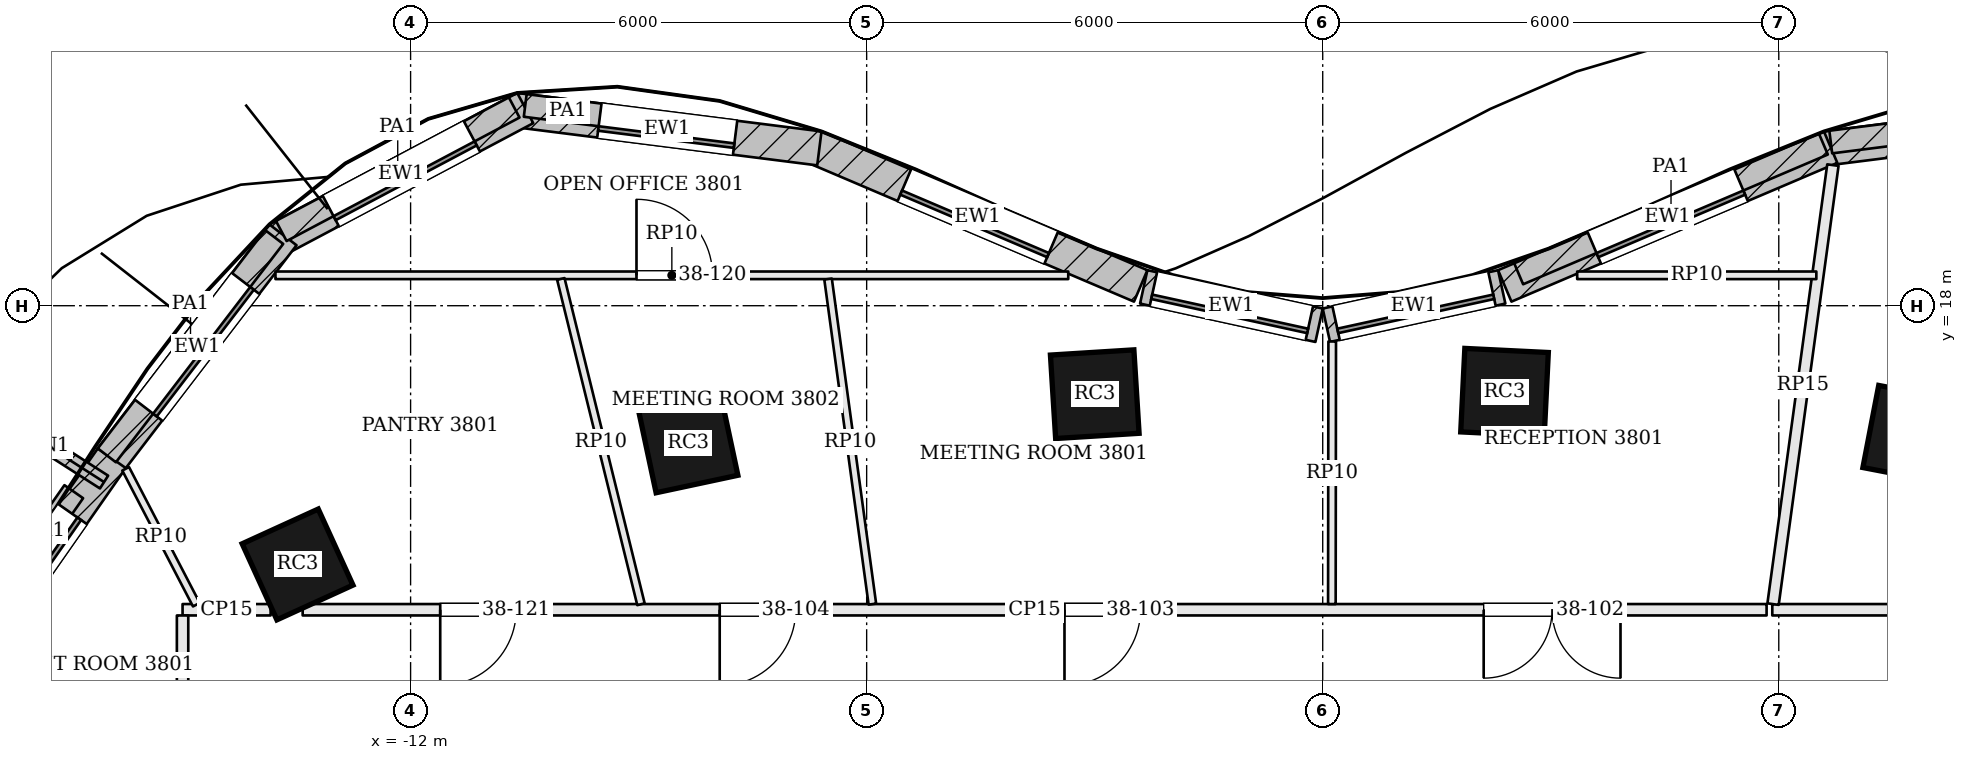
"""IFC4 building model, lengths in metres.
Left out: names, types, materials, properties, quantities, classifications, styles, units other than length and angle.
Written with IfcOpenShell. Run it as: python <this file> out.ifc"""

import sys

from ifc_helpers import new_model, si_unit, direction, frame, frame_2d, origin, origin_2d, place, context, subcontext, project, spatial, rectangle, extrude, element, fill, save


model = new_model("IFC4")
c1 = context("Model", 3, precision=1e-05, world=origin(), true_north=direction((0.0, 1.0)))
c2 = subcontext(c1, "Body", "Model", "MODEL_VIEW")
j1 = project(units=[si_unit("LENGTHUNIT", "METRE"), si_unit("PLANEANGLEUNIT", "RADIAN")], contexts=[c1])
p1 = place(None, origin())
s1 = spatial("IfcSite", under=j1, at=p1, CompositionType="ELEMENT")
p2 = place(p1, origin())
s2 = spatial("IfcBuilding", under=s1, at=p2, CompositionType="ELEMENT")
p3 = place(p2, frame((0.0, 0.0, 157.8)))
s3 = spatial("IfcBuildingStorey", under=s2, at=p3, CompositionType="ELEMENT", Elevation=157.8)
for number, where, z_axis, x_axis in (
    (1, (7.751, 16.307, 0.0), (0.0, 0.0, 1.0), (-0.982, 0.189, 0.0)),
    (2, (2.392, 16.862, 0.0), (0.0, 0.0, 1.0), (-0.999, 0.049, 0.0)),
    (3, (-2.999, 16.836, 0.0), (0.0, 0.0, 1.0), (-0.998, -0.062, 0.0)),
    (4, (-8.347, 16.192, 0.0), (0.0, 0.0, 1.0), (-0.978, -0.209, 0.0)),
    (5, (-13.487, 14.596, 0.0), (0.0, 0.0, 1.0), (-0.91, -0.415, 0.0)),
):
    element("IfcColumn", number, at=place(p3, frame(where, z_axis=z_axis, x_axis=x_axis)), inside=s3, PredefinedType="COLUMN", context=c2, shape_type="SweptSolid", body=[
        extrude(rectangle(XDim=1.1, YDim=1.1, at=origin_2d()), origin(), (0.0, 0.0, 1.0), 3.9),
    ])
p4 = place(p3, frame((10.625, 20.576, 0.0), z_axis=(0.0, 0.0, 1.0), x_axis=(-0.992109407201, -0.125375133674, 0.0)))
e6 = element("IfcWall", 6, at=p4, inside=s3, PredefinedType="SOLIDWALL", context=c2, shape_type="SweptSolid", body=[
    extrude(rectangle(XDim=4.035, YDim=0.45, at=frame_2d((2.017, 0.0))), origin(), (0.0, 0.0, 1.0), 3.7),
])
p5 = place(p4, frame((1.117, 0.0, 0.9)))
e7 = element("IfcOpeningElement", 7, at=p5, cuts=e6, PredefinedType="OPENING", context=c2, shape_type="SweptSolid", body=[
    extrude(rectangle(XDim=1.8, YDim=2.3, at=frame_2d((0.9, 1.15))), frame((0.0, 0.235, 0.0), z_axis=(0.0, -1.0, 0.0), x_axis=(1.0, 0.0, 0.0)), (0.0, 0.0, 1.0), 0.47),
])
p6 = place(p3, frame((6.682, 20.086, 0.0), z_axis=(0.0, 0.0, 1.0), x_axis=(-0.920066650468, -0.391761864781, 0.0)))
e8 = element("IfcWall", 8, at=p6, inside=s3, PredefinedType="SOLIDWALL", context=c2, shape_type="SweptSolid", body=[
    extrude(rectangle(XDim=4.66, YDim=0.45, at=frame_2d((2.33, 0.0))), origin(), (0.0, 0.0, 1.0), 3.7),
])
p7 = place(p6, frame((1.28, 0.0, 0.9)))
e9 = element("IfcOpeningElement", 9, at=p7, cuts=e8, PredefinedType="OPENING", context=c2, shape_type="SweptSolid", body=[
    extrude(rectangle(XDim=2.1, YDim=2.3, at=frame_2d((1.05, 1.15))), frame((0.0, 0.235, 0.0), z_axis=(0.0, -1.0, 0.0), x_axis=(1.0, 0.0, 0.0)), (0.0, 0.0, 1.0), 0.47),
])
p8 = place(p3, frame((2.355, 18.248, 0.0), z_axis=(0.0, 0.0, 1.0), x_axis=(-0.976877755098, -0.213798623933, 0.0)))
e10 = element("IfcWall", 10, at=p8, inside=s3, PredefinedType="SOLIDWALL", context=c2, shape_type="SweptSolid", body=[
    extrude(rectangle(XDim=2.362, YDim=0.45, at=frame_2d((1.181, 0.0))), origin(), (0.0, 0.0, 1.0), 3.7),
])
p9 = place(p8, frame((0.131, 0.0, 0.9)))
e11 = element("IfcOpeningElement", 11, at=p9, cuts=e10, PredefinedType="OPENING", context=c2, shape_type="SweptSolid", body=[
    extrude(rectangle(XDim=2.1, YDim=2.3, at=frame_2d((1.05, 1.15))), frame((0.0, 0.235, 0.0), z_axis=(0.0, -1.0, 0.0), x_axis=(1.0, 0.0, 0.0)), (0.0, 0.0, 1.0), 0.47),
])
p10 = place(p3, frame((-0.048, 17.743, 0.0), z_axis=(0.0, 0.0, 1.0), x_axis=(-0.976877755098, 0.213798623933, 0.0)))
e12 = element("IfcWall", 12, at=p10, inside=s3, PredefinedType="SOLIDWALL", context=c2, shape_type="SweptSolid", body=[
    extrude(rectangle(XDim=2.362, YDim=0.45, at=frame_2d((1.181, 0.0))), origin(), (0.0, 0.0, 1.0), 3.7),
])
p11 = place(p10, frame((0.131, 0.0, 0.9)))
e13 = element("IfcOpeningElement", 13, at=p11, cuts=e12, PredefinedType="OPENING", context=c2, shape_type="SweptSolid", body=[
    extrude(rectangle(XDim=2.1, YDim=2.3, at=frame_2d((1.05, 1.15))), frame((0.0, 0.235, 0.0), z_axis=(0.0, -1.0, 0.0), x_axis=(1.0, 0.0, 0.0)), (0.0, 0.0, 1.0), 0.47),
])
p12 = place(p3, frame((-2.395, 18.26, 0.0), z_axis=(0.0, 0.0, 1.0), x_axis=(-0.920066650468, 0.391761864781, 0.0)))
e14 = element("IfcWall", 14, at=p12, inside=s3, PredefinedType="SOLIDWALL", context=c2, shape_type="SweptSolid", body=[
    extrude(rectangle(XDim=4.66, YDim=0.45, at=frame_2d((2.33, 0.0))), origin(), (0.0, 0.0, 1.0), 3.7),
])
p13 = place(p12, frame((1.28, 0.0, 0.9)))
e15 = element("IfcOpeningElement", 15, at=p13, cuts=e14, PredefinedType="OPENING", context=c2, shape_type="SweptSolid", body=[
    extrude(rectangle(XDim=2.1, YDim=2.3, at=frame_2d((1.05, 1.15))), frame((0.0, 0.235, 0.0), z_axis=(0.0, -1.0, 0.0), x_axis=(1.0, 0.0, 0.0)), (0.0, 0.0, 1.0), 0.47),
])
p14 = place(p3, frame((-6.622, 20.07, 0.0), z_axis=(0.0, 0.0, 1.0), x_axis=(-0.992109407201, 0.125375133674, 0.0)))
e16 = element("IfcWall", 16, at=p14, inside=s3, PredefinedType="SOLIDWALL", context=c2, shape_type="SweptSolid", body=[
    extrude(rectangle(XDim=4.035, YDim=0.45, at=frame_2d((2.017, 0.0))), origin(), (0.0, 0.0, 1.0), 3.7),
])
p15 = place(p14, frame((1.117, 0.0, 0.9)))
e17 = element("IfcOpeningElement", 17, at=p15, cuts=e16, PredefinedType="OPENING", context=c2, shape_type="SweptSolid", body=[
    extrude(rectangle(XDim=1.8, YDim=2.3, at=frame_2d((0.9, 1.15))), frame((0.0, 0.235, 0.0), z_axis=(0.0, -1.0, 0.0), x_axis=(1.0, 0.0, 0.0)), (0.0, 0.0, 1.0), 0.47),
])
p16 = place(p3, frame((-10.492, 20.6, 0.0), z_axis=(0.0, 0.0, 1.0), x_axis=(-0.883502778071, -0.46842591852, 0.0)))
e18 = element("IfcWall", 18, at=p16, inside=s3, PredefinedType="SOLIDWALL", context=c2, shape_type="SweptSolid", body=[
    extrude(rectangle(XDim=3.688, YDim=0.45, at=frame_2d((1.844, 0.0))), origin(), (0.0, 0.0, 1.0), 3.7),
])
p17 = place(p16, frame((0.794, 0.0, 0.9)))
e19 = element("IfcOpeningElement", 19, at=p17, cuts=e18, PredefinedType="OPENING", context=c2, shape_type="SweptSolid", body=[
    extrude(rectangle(XDim=2.1, YDim=2.3, at=frame_2d((1.05, 1.15))), frame((0.0, 0.235, 0.0), z_axis=(0.0, -1.0, 0.0), x_axis=(1.0, 0.0, 0.0)), (0.0, 0.0, 1.0), 0.47),
])
p18 = place(p3, frame((-13.679, 18.932, 0.0), z_axis=(0.0, 0.0, 1.0), x_axis=(-0.608206493093, -0.793778849403, 0.0)))
e20 = element("IfcWall", 20, at=p18, inside=s3, PredefinedType="SOLIDWALL", context=c2, shape_type="SweptSolid", body=[
    extrude(rectangle(XDim=3.713, YDim=0.45, at=frame_2d((1.856, 0.0))), origin(), (0.0, 0.0, 1.0), 3.7),
])
p19 = place(p18, frame((0.806, 0.0, 0.9)))
e21 = element("IfcOpeningElement", 21, at=p19, cuts=e20, PredefinedType="OPENING", context=c2, shape_type="SweptSolid", body=[
    extrude(rectangle(XDim=2.1, YDim=2.3, at=frame_2d((1.05, 1.15))), frame((0.0, 0.235, 0.0), z_axis=(0.0, -1.0, 0.0), x_axis=(1.0, 0.0, 0.0)), (0.0, 0.0, 1.0), 0.47),
])
p20 = place(p3, frame((-15.931, 15.993, 0.0), z_axis=(0.0, 0.0, 1.0), x_axis=(-0.572923675708, -0.819608724828, 0.0)))
e22 = element("IfcWall", 22, at=p20, inside=s3, PredefinedType="SOLIDWALL", context=c2, shape_type="SweptSolid", body=[
    extrude(rectangle(XDim=3.895, YDim=0.45, at=frame_2d((1.947, 0.0))), origin(), (0.0, 0.0, 1.0), 3.7),
])
p21 = place(p20, frame((0.897, 0.0, 0.9)))
e23 = element("IfcOpeningElement", 23, at=p21, cuts=e22, PredefinedType="OPENING", context=c2, shape_type="SweptSolid", body=[
    extrude(rectangle(XDim=2.1, YDim=2.3, at=frame_2d((1.05, 1.15))), frame((0.0, 0.235, 0.0), z_axis=(0.0, -1.0, 0.0), x_axis=(1.0, 0.0, 0.0)), (0.0, 0.0, 1.0), 0.47),
])
p22 = place(p3, frame((-16.033, 15.68, 0.0), z_axis=(0.0, 0.0, 1.0), x_axis=(-0.842083858075, 0.539346619503, 0.0)))
e24 = element("IfcWall", 24, at=p22, inside=s3, PredefinedType="SOLIDWALL", context=c2, shape_type="SweptSolid", body=[
    extrude(rectangle(XDim=1.75, YDim=0.2, at=frame_2d((0.875, 0.0))), origin(), (0.0, 0.0, 1.0), 3.7),
])
p23 = place(p3, frame((10.492, 20.635, 3.9), z_axis=(0.0, 0.0, 1.0), x_axis=(-0.992108633106, -0.125381259031, 0.0)))
e25 = element("IfcWall", 25, at=p23, inside=s3, PredefinedType="PARAPET", context=c2, shape_type="SweptSolid", body=[
    extrude(rectangle(XDim=3.838, YDim=0.3, at=frame_2d((1.919, 0.0))), origin(), (0.0, 0.0, 1.0), 1.1),
])
p24 = place(p3, frame((6.587, 20.127, 3.9), z_axis=(0.0, 0.0, 1.0), x_axis=(-0.920058392097, -0.39178125929, 0.0)))
e26 = element("IfcWall", 26, at=p24, inside=s3, PredefinedType="PARAPET", context=c2, shape_type="SweptSolid", body=[
    extrude(rectangle(XDim=4.357, YDim=0.3, at=frame_2d((2.179, 0.0))), origin(), (0.0, 0.0, 1.0), 1.1),
])
p25 = place(p3, frame((-9.366, 20.492, 3.9), z_axis=(0.0, 0.0, 1.0), x_axis=(-0.992101446216, 0.125438113889, 0.0)))
e27 = element("IfcWall", 27, at=p25, inside=s3, PredefinedType="PARAPET", context=c2, shape_type="SweptSolid", body=[
    extrude(rectangle(XDim=1.135, YDim=0.3, at=frame_2d((0.567, 0.0))), origin(), (0.0, 0.0, 1.0), 1.1),
])
p26 = place(p3, frame((-10.637, 20.608, 3.9), z_axis=(0.0, 0.0, 1.0), x_axis=(-0.88348638041, -0.468456845003, 0.0)))
e28 = element("IfcWall", 28, at=p26, inside=s3, PredefinedType="PARAPET", context=c2, shape_type="SweptSolid", body=[
    extrude(rectangle(XDim=3.468, YDim=0.3, at=frame_2d((1.734, 0.0))), origin(), (0.0, 0.0, 1.0), 1.1),
])
p27 = place(p3, frame((-13.795, 18.904, 3.9), z_axis=(0.0, 0.0, 1.0), x_axis=(-0.608203510632, -0.793781134605, 0.0)))
e29 = element("IfcWall", 29, at=p27, inside=s3, PredefinedType="PARAPET", context=c2, shape_type="SweptSolid", body=[
    extrude(rectangle(XDim=3.619, YDim=0.3, at=frame_2d((1.81, 0.0))), origin(), (0.0, 0.0, 1.0), 1.1),
])
p28 = place(p3, frame((-16.431, 15.553, 3.9), z_axis=(0.0, 0.0, 1.0), x_axis=(-0.572902892741, -0.819623252165, 0.0)))
e30 = element("IfcWall", 30, at=p28, inside=s3, PredefinedType="PARAPET", context=c2, shape_type="SweptSolid", body=[
    extrude(rectangle(XDim=1.26, YDim=0.3, at=frame_2d((0.63, 0.0))), origin(), (0.0, 0.0, 1.0), 1.1),
])
p29 = place(p3, frame((14.925, 14.0, 0.0), z_axis=(0.0, 0.0, 1.0), x_axis=(-1.0, 0.0, 0.0)))
e31 = element("IfcWall", 31, at=p29, inside=s3, PredefinedType="PARTITIONING", context=c2, shape_type="SweptSolid", body=[
    extrude(rectangle(XDim=9.01, YDim=0.15, at=frame_2d((4.505, 0.0))), origin(), (0.0, 0.0, 1.0), 3.198),
])
p30 = place(p3, frame((6.712, 19.85, 0.0), z_axis=(0.0, 0.0, 1.0), x_axis=(-0.135032835288, -0.990841124194, 0.0)))
e32 = element("IfcWall", 32, at=p30, inside=s3, PredefinedType="PARTITIONING", context=c2, shape_type="SweptSolid", body=[
    extrude(rectangle(XDim=5.829, YDim=0.15, at=frame_2d((2.915, 0.0))), origin(), (0.0, 0.0, 1.0), 3.234),
])
p31 = place(p3, frame((5.84, 14.0, 0.0), z_axis=(0.0, 0.0, 1.0), x_axis=(-1.0, 0.0, 0.0)))
e33 = element("IfcWall", 33, at=p31, inside=s3, PredefinedType="PARTITIONING", context=c2, shape_type="SweptSolid", body=[
    extrude(rectangle(XDim=19.26, YDim=0.15, at=frame_2d((9.63, 0.0))), origin(), (0.0, 0.0, 1.0), 3.198),
])
p32 = place(p31, frame((1.922, 0.0, 0.0)))
e34 = element("IfcOpeningElement", 34, at=p32, cuts=e33, PredefinedType="OPENING", context=c2, shape_type="SweptSolid", body=[
    extrude(rectangle(XDim=1.8, YDim=2.1, at=frame_2d((0.9, 1.05))), frame((0.0, 0.085, 0.0), z_axis=(0.0, -1.0, 0.0), x_axis=(1.0, 0.0, 0.0)), (0.0, 0.0, 1.0), 0.17),
])
p33 = place(p31, frame((8.237, 0.0, 0.0)))
e35 = element("IfcOpeningElement", 35, at=p33, cuts=e33, PredefinedType="OPENING", context=c2, shape_type="SweptSolid", body=[
    extrude(rectangle(XDim=1.0, YDim=2.4, at=frame_2d((0.5, 1.2))), frame((0.0, 0.085, 0.0), z_axis=(0.0, -1.0, 0.0), x_axis=(1.0, 0.0, 0.0)), (0.0, 0.0, 1.0), 0.17),
])
p34 = place(p31, frame((12.773, 0.0, 0.0)))
e36 = element("IfcOpeningElement", 36, at=p34, cuts=e33, PredefinedType="OPENING", context=c2, shape_type="SweptSolid", body=[
    extrude(rectangle(XDim=1.0, YDim=2.4, at=frame_2d((0.5, 1.2))), frame((0.0, 0.085, 0.0), z_axis=(0.0, -1.0, 0.0), x_axis=(1.0, 0.0, 0.0)), (0.0, 0.0, 1.0), 0.17),
])
p35 = place(p31, frame((16.45, 0.0, 0.0)))
e37 = element("IfcOpeningElement", 37, at=p35, cuts=e33, PredefinedType="OPENING", context=c2, shape_type="SweptSolid", body=[
    extrude(rectangle(XDim=1.0, YDim=2.1, at=frame_2d((0.5, 1.05))), frame((0.0, 0.085, 0.0), z_axis=(0.0, -1.0, 0.0), x_axis=(1.0, 0.0, 0.0)), (0.0, 0.0, 1.0), 0.17),
])
p36 = place(p3, frame((-13.842, 14.0, 0.0), z_axis=(0.0, 0.0, 1.0), x_axis=(-1.0, 0.0, 0.0)))
e38 = element("IfcWall", 38, at=p36, inside=s3, PredefinedType="PARTITIONING", context=c2, shape_type="SweptSolid", body=[
    extrude(rectangle(XDim=1.158, YDim=0.15, at=frame_2d((0.579, 0.0))), origin(), (0.0, 0.0, 1.0), 3.198),
])
p37 = place(p3, frame((-15.0, 13.925, 0.0), z_axis=(0.0, 0.0, 1.0), x_axis=(0.0, -1.0, 0.0)))
e39 = element("IfcWall", 39, at=p37, inside=s3, PredefinedType="PARTITIONING", context=c2, shape_type="SweptSolid", body=[
    extrude(rectangle(XDim=4.596, YDim=0.15, at=frame_2d((2.298, 0.0))), origin(), (0.0, 0.0, 1.0), 3.198),
])
p38 = place(p37, frame((1.85, 0.0, 0.0)))
e40 = element("IfcOpeningElement", 40, at=p38, cuts=e39, PredefinedType="OPENING", context=c2, shape_type="SweptSolid", body=[
    extrude(rectangle(XDim=0.9, YDim=2.1, at=frame_2d((0.45, 1.05))), frame((0.0, 0.085, 0.0), z_axis=(0.0, -1.0, 0.0), x_axis=(1.0, 0.0, 0.0)), (0.0, 0.0, 1.0), 0.17),
])
p39 = place(p3, frame((-13.778, 18.4, 0.0), z_axis=(0.0, 0.0, 1.0), x_axis=(1.0, 0.0, 0.0)))
e41 = element("IfcWall", 41, at=p39, inside=s3, PredefinedType="PARTITIONING", context=c2, shape_type="SweptSolid", body=[
    extrude(rectangle(XDim=10.43, YDim=0.1, at=frame_2d((5.215, 0.0))), origin(), (0.0, 0.0, 1.0), 3.184),
])
p40 = place(p39, frame((4.75, 0.0, 0.0)))
e42 = element("IfcOpeningElement", 42, at=p40, cuts=e41, PredefinedType="OPENING", context=c2, shape_type="SweptSolid", body=[
    extrude(rectangle(XDim=1.0, YDim=2.4, at=frame_2d((0.5, 1.2))), frame((0.0, 0.06, 0.0), z_axis=(0.0, -1.0, 0.0), x_axis=(1.0, 0.0, 0.0)), (0.0, 0.0, 1.0), 0.12),
])
p41 = place(p3, frame((3.348, 18.4, 0.0), z_axis=(0.0, 0.0, 1.0), x_axis=(1.0, 0.0, 0.0)))
e43 = element("IfcWall", 43, at=p41, inside=s3, PredefinedType="PARTITIONING", context=c2, shape_type="SweptSolid", body=[
    extrude(rectangle(XDim=3.146, YDim=0.1, at=frame_2d((1.573, 0.0))), origin(), (0.0, 0.0, 1.0), 3.184),
])
p42 = place(p3, frame((0.12, 14.075, 0.0), z_axis=(0.0, 0.0, 1.0), x_axis=(0.001342849874, 0.999999098377, 0.0)))
e44 = element("IfcWall", 44, at=p42, inside=s3, PredefinedType="PARTITIONING", context=c2, shape_type="SweptSolid", body=[
    extrude(rectangle(XDim=3.454, YDim=0.1, at=frame_2d((1.727, 0.0))), origin(), (0.0, 0.0, 1.0), 3.184),
])
p43 = place(p3, frame((-5.925, 14.074, 0.0), z_axis=(0.0, 0.0, 1.0), x_axis=(-0.135027377195, 0.990841868013, 0.0)))
e45 = element("IfcWall", 45, at=p43, inside=s3, PredefinedType="PARTITIONING", context=c2, shape_type="SweptSolid", body=[
    extrude(rectangle(XDim=4.316, YDim=0.1, at=frame_2d((2.158, 0.0))), origin(), (0.0, 0.0, 1.0), 3.184),
])
p44 = place(p3, frame((-8.969, 14.073, 0.0), z_axis=(0.0, 0.0, 1.0), x_axis=(-0.239223165208, 0.970964611728, 0.0)))
e46 = element("IfcWall", 46, at=p44, inside=s3, PredefinedType="PARTITIONING", context=c2, shape_type="SweptSolid", body=[
    extrude(rectangle(XDim=4.407, YDim=0.1, at=frame_2d((2.203, 0.0))), origin(), (0.0, 0.0, 1.0), 3.184),
])
p45 = place(p3, frame((-14.819, 14.066, 0.0), z_axis=(0.0, 0.0, 1.0), x_axis=(-0.461451910157, 0.887165223965, 0.0)))
e47 = element("IfcWall", 47, at=p45, inside=s3, PredefinedType="PARTITIONING", context=c2, shape_type="SweptSolid", body=[
    extrude(rectangle(XDim=2.015, YDim=0.1, at=frame_2d((1.008, 0.0))), origin(), (0.0, 0.0, 1.0), 3.184),
])
p46 = place(p7, origin())
e48 = element("IfcWindow", 48, at=p46, inside=s3, PartitioningType="SINGLE_PANEL", PredefinedType="WINDOW", context=c2, shape_type="SweptSolid", body=[
    extrude(rectangle(XDim=2.1, YDim=2.3, at=frame_2d((1.05, 1.15))), frame((0.0, 0.135, 0.0), z_axis=(0.0, -1.0, 0.0), x_axis=(1.0, 0.0, 0.0)), (0.0, 0.0, 1.0), 0.06),
])
fill(e9, e48)
p47 = place(p9, origin())
e49 = element("IfcWindow", 49, at=p47, inside=s3, PartitioningType="SINGLE_PANEL", PredefinedType="WINDOW", context=c2, shape_type="SweptSolid", body=[
    extrude(rectangle(XDim=2.1, YDim=2.3, at=frame_2d((1.05, 1.15))), frame((0.0, 0.135, 0.0), z_axis=(0.0, -1.0, 0.0), x_axis=(1.0, 0.0, 0.0)), (0.0, 0.0, 1.0), 0.06),
])
fill(e11, e49)
p48 = place(p11, origin())
e50 = element("IfcWindow", 50, at=p48, inside=s3, PartitioningType="SINGLE_PANEL", PredefinedType="WINDOW", context=c2, shape_type="SweptSolid", body=[
    extrude(rectangle(XDim=2.1, YDim=2.3, at=frame_2d((1.05, 1.15))), frame((0.0, 0.135, 0.0), z_axis=(0.0, -1.0, 0.0), x_axis=(1.0, 0.0, 0.0)), (0.0, 0.0, 1.0), 0.06),
])
fill(e13, e50)
p49 = place(p13, origin())
e51 = element("IfcWindow", 51, at=p49, inside=s3, PartitioningType="SINGLE_PANEL", PredefinedType="WINDOW", context=c2, shape_type="SweptSolid", body=[
    extrude(rectangle(XDim=2.1, YDim=2.3, at=frame_2d((1.05, 1.15))), frame((0.0, 0.135, 0.0), z_axis=(0.0, -1.0, 0.0), x_axis=(1.0, 0.0, 0.0)), (0.0, 0.0, 1.0), 0.06),
])
fill(e15, e51)
p50 = place(p15, origin())
e52 = element("IfcWindow", 52, at=p50, inside=s3, PartitioningType="SINGLE_PANEL", PredefinedType="WINDOW", context=c2, shape_type="SweptSolid", body=[
    extrude(rectangle(XDim=1.8, YDim=2.3, at=frame_2d((0.9, 1.15))), frame((0.0, 0.135, 0.0), z_axis=(0.0, -1.0, 0.0), x_axis=(1.0, 0.0, 0.0)), (0.0, 0.0, 1.0), 0.06),
])
fill(e17, e52)
p51 = place(p17, origin())
e53 = element("IfcWindow", 53, at=p51, inside=s3, PartitioningType="SINGLE_PANEL", PredefinedType="WINDOW", context=c2, shape_type="SweptSolid", body=[
    extrude(rectangle(XDim=2.1, YDim=2.3, at=frame_2d((1.05, 1.15))), frame((0.0, 0.135, 0.0), z_axis=(0.0, -1.0, 0.0), x_axis=(1.0, 0.0, 0.0)), (0.0, 0.0, 1.0), 0.06),
])
fill(e19, e53)
p52 = place(p19, origin())
e54 = element("IfcWindow", 54, at=p52, inside=s3, PartitioningType="SINGLE_PANEL", PredefinedType="WINDOW", context=c2, shape_type="SweptSolid", body=[
    extrude(rectangle(XDim=2.1, YDim=2.3, at=frame_2d((1.05, 1.15))), frame((0.0, 0.135, 0.0), z_axis=(0.0, -1.0, 0.0), x_axis=(1.0, 0.0, 0.0)), (0.0, 0.0, 1.0), 0.06),
])
fill(e21, e54)
p53 = place(p21, origin())
e55 = element("IfcWindow", 55, at=p53, inside=s3, PartitioningType="SINGLE_PANEL", PredefinedType="WINDOW", context=c2, shape_type="SweptSolid", body=[
    extrude(rectangle(XDim=2.1, YDim=2.3, at=frame_2d((1.05, 1.15))), frame((0.0, 0.135, 0.0), z_axis=(0.0, -1.0, 0.0), x_axis=(1.0, 0.0, 0.0)), (0.0, 0.0, 1.0), 0.06),
])
fill(e23, e55)
p54 = place(p32, origin())
e56 = element("IfcDoor", 56, at=p54, inside=s3, OperationType="DOUBLE_DOOR_SINGLE_SWING", PredefinedType="DOOR", context=c2, shape_type="SweptSolid", body=[
    extrude(rectangle(XDim=1.8, YDim=2.1, at=frame_2d((0.9, 1.05))), frame((0.0, 0.025, 0.0), z_axis=(0.0, -1.0, 0.0), x_axis=(1.0, 0.0, 0.0)), (0.0, 0.0, 1.0), 0.05),
])
fill(e34, e56)
p55 = place(p33, origin())
e57 = element("IfcDoor", 57, at=p55, inside=s3, OperationType="SINGLE_SWING_RIGHT", PredefinedType="DOOR", context=c2, shape_type="SweptSolid", body=[
    extrude(rectangle(XDim=1.0, YDim=2.4, at=frame_2d((0.5, 1.2))), frame((0.0, 0.025, 0.0), z_axis=(0.0, -1.0, 0.0), x_axis=(1.0, 0.0, 0.0)), (0.0, 0.0, 1.0), 0.05),
])
fill(e35, e57)
p56 = place(p34, origin())
e58 = element("IfcDoor", 58, at=p56, inside=s3, OperationType="SINGLE_SWING_RIGHT", PredefinedType="DOOR", context=c2, shape_type="SweptSolid", body=[
    extrude(rectangle(XDim=1.0, YDim=2.4, at=frame_2d((0.5, 1.2))), frame((0.0, 0.025, 0.0), z_axis=(0.0, -1.0, 0.0), x_axis=(1.0, 0.0, 0.0)), (0.0, 0.0, 1.0), 0.05),
])
fill(e36, e58)
p57 = place(p40, origin())
e59 = element("IfcDoor", 59, at=p57, inside=s3, OperationType="SINGLE_SWING_LEFT", PredefinedType="DOOR", context=c2, shape_type="SweptSolid", body=[
    extrude(rectangle(XDim=1.0, YDim=2.4, at=frame_2d((0.5, 1.2))), frame((0.0, 0.025, 0.0), z_axis=(0.0, -1.0, 0.0), x_axis=(1.0, 0.0, 0.0)), (0.0, 0.0, 1.0), 0.05),
])
fill(e42, e59)
p58 = place(p35, origin())
e60 = element("IfcDoor", 60, at=p58, inside=s3, OperationType="SINGLE_SWING_RIGHT", PredefinedType="DOOR", context=c2, shape_type="SweptSolid", body=[
    extrude(rectangle(XDim=1.0, YDim=2.1, at=frame_2d((0.5, 1.05))), frame((0.0, 0.025, 0.0), z_axis=(0.0, -1.0, 0.0), x_axis=(1.0, 0.0, 0.0)), (0.0, 0.0, 1.0), 0.05),
])
fill(e37, e60)
save(model, sys.argv[1])
